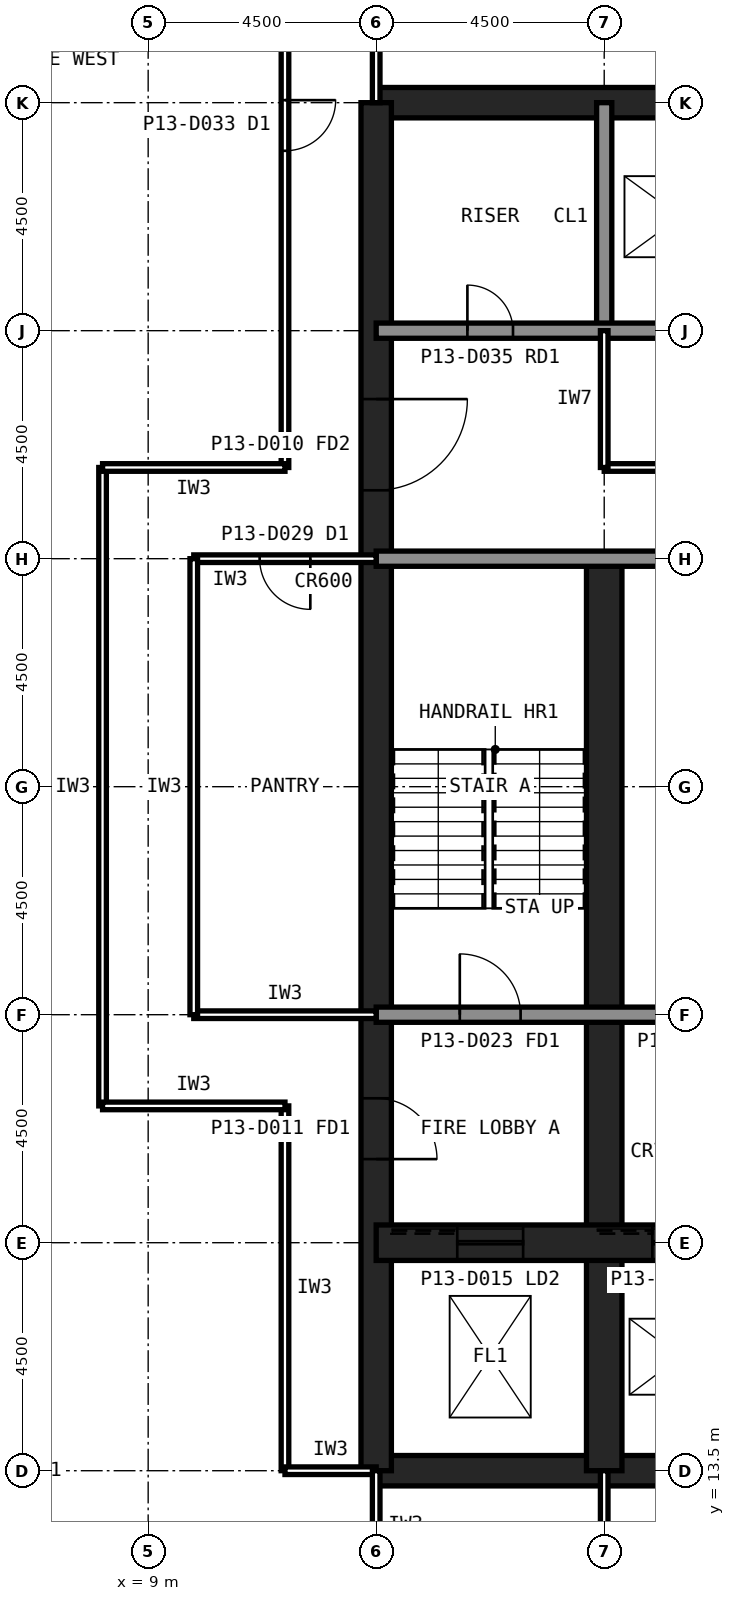
"""IFC4 building model, lengths in metres.
Left out: names, types, materials, properties, quantities, classifications, styles, units other than length and angle.
Written with IfcOpenShell. Run it as: python <this file> out.ifc"""

import sys

from ifc_helpers import new_model, si_unit, direction, frame, frame_2d, origin, place, context, subcontext, project, spatial, rectangle, extrude, element, fill, save


model = new_model("IFC4")
c1 = context("Model", 3, precision=1e-05, world=origin(), true_north=direction((0.0, 1.0)))
c2 = subcontext(c1, "Body", "Model", "MODEL_VIEW")
j1 = project(units=[si_unit("LENGTHUNIT", "METRE"), si_unit("PLANEANGLEUNIT", "RADIAN")], contexts=[c1])
p1 = place(None, origin())
s1 = spatial("IfcSite", under=j1, at=p1, CompositionType="ELEMENT")
p2 = place(p1, origin())
s2 = spatial("IfcBuilding", under=s1, at=p2, CompositionType="ELEMENT")
p3 = place(p2, frame((0.0, 0.0, 54.2)))
s3 = spatial("IfcBuildingStorey", under=s2, at=p3, CompositionType="ELEMENT", Elevation=54.2)
for number, where, z_axis, x_axis in (
    (1, (13.5, 13.5, 0.0), (0.0, 0.0, 1.0), (1.0, 0.0, 0.0)),
    (2, (40.5, 40.5, 0.0), (0.0, 0.0, 1.0), (-1.0, 0.0, 0.0)),
):
    element("IfcWall", number, at=place(p3, frame(where, z_axis=z_axis, x_axis=x_axis)), inside=s3, PredefinedType="SHEAR", context=c2, shape_type="SweptSolid", body=[
        extrude(rectangle(XDim=27.0, YDim=0.6, at=frame_2d((13.5, 0.0))), origin(), (0.0, 0.0, 1.0), 4.2),
    ])
p4 = place(p3, frame((13.5, 40.5, 0.0), z_axis=(0.0, 0.0, 1.0), x_axis=(0.0, -1.0, 0.0)))
e3 = element("IfcWall", 3, at=p4, inside=s3, PredefinedType="SHEAR", context=c2, shape_type="SweptSolid", body=[
    extrude(rectangle(XDim=27.0, YDim=0.6, at=frame_2d((13.5, 0.0))), origin(), (0.0, 0.0, 1.0), 4.2),
])
p5 = place(p4, frame((19.65, 0.0, 0.0)))
e4 = element("IfcOpeningElement", 4, at=p5, cuts=e3, PredefinedType="OPENING", context=c2, shape_type="SweptSolid", body=[
    extrude(rectangle(XDim=1.2, YDim=2.1, at=frame_2d((0.6, 1.05))), frame((0.0, 0.31, 0.0), z_axis=(0.0, -1.0, 0.0), x_axis=(1.0, 0.0, 0.0)), (0.0, 0.0, 1.0), 0.62),
])
p6 = place(p4, frame((5.85, 0.0, 0.0)))
e5 = element("IfcOpeningElement", 5, at=p6, cuts=e3, PredefinedType="OPENING", context=c2, shape_type="SweptSolid", body=[
    extrude(rectangle(XDim=1.8, YDim=2.1, at=frame_2d((0.9, 1.05))), frame((0.0, 0.31, 0.0), z_axis=(0.0, -1.0, 0.0), x_axis=(1.0, 0.0, 0.0)), (0.0, 0.0, 1.0), 0.62),
])
p7 = place(p3, frame((18.0, 13.5, 0.0), z_axis=(0.0, 0.0, 1.0), x_axis=(0.0, 1.0, 0.0)))
e6 = element("IfcWall", 6, at=p7, inside=s3, PredefinedType="SHEAR", context=c2, shape_type="SweptSolid", body=[
    extrude(rectangle(XDim=18.0, YDim=0.7, at=frame_2d((9.0, 0.0))), origin(), (0.0, 0.0, 1.0), 4.2),
])
p8 = place(p3, frame((18.0, 36.0, 0.0), z_axis=(0.0, 0.0, 1.0), x_axis=(0.0, 1.0, 0.0)))
e7 = element("IfcWall", 7, at=p8, inside=s3, PredefinedType="SOLIDWALL", context=c2, shape_type="SweptSolid", body=[
    extrude(rectangle(XDim=4.5, YDim=0.3, at=frame_2d((2.25, 0.0))), origin(), (0.0, 0.0, 1.0), 4.04),
])
p9 = place(p3, frame((13.5, 18.0, 0.0), z_axis=(0.0, 0.0, 1.0), x_axis=(1.0, 0.0, 0.0)))
e8 = element("IfcWall", 8, at=p9, inside=s3, PredefinedType="SHEAR", context=c2, shape_type="SweptSolid", body=[
    extrude(rectangle(XDim=27.0, YDim=0.7, at=frame_2d((13.5, 0.0))), origin(), (0.0, 0.0, 1.0), 4.2),
])
p10 = place(p9, frame((24.3, 0.0, 0.0)))
e9 = element("IfcOpeningElement", 9, at=p10, cuts=e8, PredefinedType="OPENING", context=c2, shape_type="SweptSolid", body=[
    extrude(rectangle(XDim=0.9, YDim=2.1, at=frame_2d((0.45, 1.05))), frame((0.0, 0.36, 0.0), z_axis=(0.0, -1.0, 0.0), x_axis=(1.0, 0.0, 0.0)), (0.0, 0.0, 1.0), 0.72),
])
p11 = place(p9, frame((5.45, 0.0, 0.0)))
e10 = element("IfcOpeningElement", 10, at=p11, cuts=e8, PredefinedType="OPENING", context=c2, shape_type="SweptSolid", body=[
    extrude(rectangle(XDim=1.1, YDim=2.1, at=frame_2d((0.55, 1.05))), frame((0.0, 0.36, 0.0), z_axis=(0.0, -1.0, 0.0), x_axis=(1.0, 0.0, 0.0)), (0.0, 0.0, 1.0), 0.72),
])
p12 = place(p9, frame((8.45, 0.0, 0.0)))
e11 = element("IfcOpeningElement", 11, at=p12, cuts=e8, PredefinedType="OPENING", context=c2, shape_type="SweptSolid", body=[
    extrude(rectangle(XDim=1.1, YDim=2.1, at=frame_2d((0.55, 1.05))), frame((0.0, 0.36, 0.0), z_axis=(0.0, -1.0, 0.0), x_axis=(1.0, 0.0, 0.0)), (0.0, 0.0, 1.0), 0.72),
])
p13 = place(p9, frame((11.45, 0.0, 0.0)))
e12 = element("IfcOpeningElement", 12, at=p13, cuts=e8, PredefinedType="OPENING", context=c2, shape_type="SweptSolid", body=[
    extrude(rectangle(XDim=1.1, YDim=2.1, at=frame_2d((0.55, 1.05))), frame((0.0, 0.36, 0.0), z_axis=(0.0, -1.0, 0.0), x_axis=(1.0, 0.0, 0.0)), (0.0, 0.0, 1.0), 0.72),
])
p14 = place(p9, frame((14.45, 0.0, 0.0)))
e13 = element("IfcOpeningElement", 13, at=p14, cuts=e8, PredefinedType="OPENING", context=c2, shape_type="SweptSolid", body=[
    extrude(rectangle(XDim=1.1, YDim=2.1, at=frame_2d((0.55, 1.05))), frame((0.0, 0.36, 0.0), z_axis=(0.0, -1.0, 0.0), x_axis=(1.0, 0.0, 0.0)), (0.0, 0.0, 1.0), 0.72),
])
p15 = place(p9, frame((17.45, 0.0, 0.0)))
e14 = element("IfcOpeningElement", 14, at=p15, cuts=e8, PredefinedType="OPENING", context=c2, shape_type="SweptSolid", body=[
    extrude(rectangle(XDim=1.1, YDim=2.1, at=frame_2d((0.55, 1.05))), frame((0.0, 0.36, 0.0), z_axis=(0.0, -1.0, 0.0), x_axis=(1.0, 0.0, 0.0)), (0.0, 0.0, 1.0), 0.72),
])
p16 = place(p9, frame((20.45, 0.0, 0.0)))
e15 = element("IfcOpeningElement", 15, at=p16, cuts=e8, PredefinedType="OPENING", context=c2, shape_type="SweptSolid", body=[
    extrude(rectangle(XDim=1.1, YDim=2.1, at=frame_2d((0.55, 1.05))), frame((0.0, 0.36, 0.0), z_axis=(0.0, -1.0, 0.0), x_axis=(1.0, 0.0, 0.0)), (0.0, 0.0, 1.0), 0.72),
])
p17 = place(p9, frame((1.6, 0.0, 0.0)))
e16 = element("IfcOpeningElement", 16, at=p17, cuts=e8, PredefinedType="OPENING", context=c2, shape_type="SweptSolid", body=[
    extrude(rectangle(XDim=1.3, YDim=2.2, at=frame_2d((0.65, 1.1))), frame((0.0, 0.36, 0.0), z_axis=(0.0, -1.0, 0.0), x_axis=(1.0, 0.0, 0.0)), (0.0, 0.0, 1.0), 0.72),
])
p18 = place(p3, frame((13.5, 36.0, 0.0), z_axis=(0.0, 0.0, 1.0), x_axis=(1.0, 0.0, 0.0)))
e17 = element("IfcWall", 17, at=p18, inside=s3, PredefinedType="SOLIDWALL", context=c2, shape_type="SweptSolid", body=[
    extrude(rectangle(XDim=27.0, YDim=0.3, at=frame_2d((13.5, 0.0))), origin(), (0.0, 0.0, 1.0), 4.04),
])
p19 = place(p18, frame((1.8, 0.0, 0.0)))
e18 = element("IfcOpeningElement", 18, at=p19, cuts=e17, PredefinedType="OPENING", context=c2, shape_type="SweptSolid", body=[
    extrude(rectangle(XDim=0.9, YDim=2.1, at=frame_2d((0.45, 1.05))), frame((0.0, 0.16, 0.0), z_axis=(0.0, -1.0, 0.0), x_axis=(1.0, 0.0, 0.0)), (0.0, 0.0, 1.0), 0.32),
])
p20 = place(p18, frame((24.1, 0.0, 0.0)))
e19 = element("IfcOpeningElement", 19, at=p20, cuts=e17, PredefinedType="OPENING", context=c2, shape_type="SweptSolid", body=[
    extrude(rectangle(XDim=1.3, YDim=2.2, at=frame_2d((0.65, 1.1))), frame((0.0, 0.16, 0.0), z_axis=(0.0, -1.0, 0.0), x_axis=(1.0, 0.0, 0.0)), (0.0, 0.0, 1.0), 0.32),
])
p21 = place(p3, frame((13.5, 22.5, 0.0), z_axis=(0.0, 0.0, 1.0), x_axis=(1.0, 0.0, 0.0)))
e20 = element("IfcWall", 20, at=p21, inside=s3, PredefinedType="SOLIDWALL", context=c2, shape_type="SweptSolid", body=[
    extrude(rectangle(XDim=27.0, YDim=0.3, at=frame_2d((13.5, 0.0))), origin(), (0.0, 0.0, 1.0), 4.04),
])
p22 = place(p21, frame((1.65, 0.0, 0.0)))
e21 = element("IfcOpeningElement", 21, at=p22, cuts=e20, PredefinedType="OPENING", context=c2, shape_type="SweptSolid", body=[
    extrude(rectangle(XDim=1.2, YDim=2.1, at=frame_2d((0.6, 1.05))), frame((0.0, 0.16, 0.0), z_axis=(0.0, -1.0, 0.0), x_axis=(1.0, 0.0, 0.0)), (0.0, 0.0, 1.0), 0.32),
])
p23 = place(p21, frame((6.025, 0.0, 0.0)))
e22 = element("IfcOpeningElement", 22, at=p23, cuts=e20, PredefinedType="OPENING", context=c2, shape_type="SweptSolid", body=[
    extrude(rectangle(XDim=1.0, YDim=2.1, at=frame_2d((0.5, 1.05))), frame((0.0, 0.16, 0.0), z_axis=(0.0, -1.0, 0.0), x_axis=(1.0, 0.0, 0.0)), (0.0, 0.0, 1.0), 0.32),
])
p24 = place(p21, frame((10.525, 0.0, 0.0)))
e23 = element("IfcOpeningElement", 23, at=p24, cuts=e20, PredefinedType="OPENING", context=c2, shape_type="SweptSolid", body=[
    extrude(rectangle(XDim=1.0, YDim=2.1, at=frame_2d((0.5, 1.05))), frame((0.0, 0.16, 0.0), z_axis=(0.0, -1.0, 0.0), x_axis=(1.0, 0.0, 0.0)), (0.0, 0.0, 1.0), 0.32),
])
p25 = place(p21, frame((19.75, 0.0, 0.0)))
e24 = element("IfcOpeningElement", 24, at=p25, cuts=e20, PredefinedType="OPENING", context=c2, shape_type="SweptSolid", body=[
    extrude(rectangle(XDim=1.0, YDim=2.1, at=frame_2d((0.5, 1.05))), frame((0.0, 0.16, 0.0), z_axis=(0.0, -1.0, 0.0), x_axis=(1.0, 0.0, 0.0)), (0.0, 0.0, 1.0), 0.32),
])
p26 = place(p21, frame((15.05, 0.0, 0.0)))
e25 = element("IfcOpeningElement", 25, at=p26, cuts=e20, PredefinedType="OPENING", context=c2, shape_type="SweptSolid", body=[
    extrude(rectangle(XDim=1.4, YDim=2.4, at=frame_2d((0.7, 1.2))), frame((0.0, 0.16, 0.0), z_axis=(0.0, -1.0, 0.0), x_axis=(1.0, 0.0, 0.0)), (0.0, 0.0, 1.0), 0.32),
])
p27 = place(p3, frame((13.5, 31.5, 0.0), z_axis=(0.0, 0.0, 1.0), x_axis=(1.0, 0.0, 0.0)))
e26 = element("IfcWall", 26, at=p27, inside=s3, PredefinedType="SOLIDWALL", context=c2, shape_type="SweptSolid", body=[
    extrude(rectangle(XDim=27.0, YDim=0.3, at=frame_2d((13.5, 0.0))), origin(), (0.0, 0.0, 1.0), 4.04),
])
p28 = place(p27, frame((24.15, 0.0, 0.0)))
e27 = element("IfcOpeningElement", 27, at=p28, cuts=e26, PredefinedType="OPENING", context=c2, shape_type="SweptSolid", body=[
    extrude(rectangle(XDim=1.2, YDim=2.1, at=frame_2d((0.6, 1.05))), frame((0.0, 0.16, 0.0), z_axis=(0.0, -1.0, 0.0), x_axis=(1.0, 0.0, 0.0)), (0.0, 0.0, 1.0), 0.32),
])
p29 = place(p27, frame((15.3, 0.0, 0.0)))
e28 = element("IfcOpeningElement", 28, at=p29, cuts=e26, PredefinedType="OPENING", context=c2, shape_type="SweptSolid", body=[
    extrude(rectangle(XDim=0.9, YDim=2.1, at=frame_2d((0.45, 1.05))), frame((0.0, 0.16, 0.0), z_axis=(0.0, -1.0, 0.0), x_axis=(1.0, 0.0, 0.0)), (0.0, 0.0, 1.0), 0.32),
])
p30 = place(p27, frame((19.8, 0.0, 0.0)))
e29 = element("IfcOpeningElement", 29, at=p30, cuts=e26, PredefinedType="OPENING", context=c2, shape_type="SweptSolid", body=[
    extrude(rectangle(XDim=0.9, YDim=2.1, at=frame_2d((0.45, 1.05))), frame((0.0, 0.16, 0.0), z_axis=(0.0, -1.0, 0.0), x_axis=(1.0, 0.0, 0.0)), (0.0, 0.0, 1.0), 0.32),
])
p31 = place(p3, frame((18.0, 33.3, 0.0), z_axis=(0.0, 0.0, 1.0), x_axis=(1.0, 0.0, 0.0)))
e30 = element("IfcWall", 30, at=p31, inside=s3, PredefinedType="PARTITIONING", context=c2, shape_type="SweptSolid", body=[
    extrude(rectangle(XDim=18.0, YDim=0.15, at=frame_2d((9.0, 0.0))), origin(), (0.0, 0.0, 1.0), 4.04),
])
p32 = place(p31, frame((5.55, 0.0, 0.0)))
e31 = element("IfcOpeningElement", 31, at=p32, cuts=e30, PredefinedType="OPENING", context=c2, shape_type="SweptSolid", body=[
    extrude(rectangle(XDim=0.9, YDim=2.1, at=frame_2d((0.45, 1.05))), frame((0.0, 0.085, 0.0), z_axis=(0.0, -1.0, 0.0), x_axis=(1.0, 0.0, 0.0)), (0.0, 0.0, 1.0), 0.17),
])
p33 = place(p31, frame((14.55, 0.0, 0.0)))
e32 = element("IfcOpeningElement", 32, at=p33, cuts=e30, PredefinedType="OPENING", context=c2, shape_type="SweptSolid", body=[
    extrude(rectangle(XDim=0.9, YDim=2.1, at=frame_2d((0.45, 1.05))), frame((0.0, 0.085, 0.0), z_axis=(0.0, -1.0, 0.0), x_axis=(1.0, 0.0, 0.0)), (0.0, 0.0, 1.0), 0.17),
])
p34 = place(p3, frame((18.0, 33.3, 0.0), z_axis=(0.0, 0.0, 1.0), x_axis=(0.0, 1.0, 0.0)))
e33 = element("IfcWall", 33, at=p34, inside=s3, PredefinedType="PARTITIONING", context=c2, shape_type="SweptSolid", body=[
    extrude(rectangle(XDim=2.7, YDim=0.15, at=frame_2d((1.35, 0.0))), origin(), (0.0, 0.0, 1.0), 4.04),
])
p35 = place(p3, frame((8.1, 33.3, 0.0), z_axis=(0.0, 0.0, 1.0), x_axis=(0.0, -1.0, 0.0)))
e34 = element("IfcWall", 34, at=p35, inside=s3, PredefinedType="PARTITIONING", context=c2, shape_type="SweptSolid", body=[
    extrude(rectangle(XDim=12.6, YDim=0.15, at=frame_2d((6.3, 0.0))), origin(), (0.0, 0.0, 1.0), 4.04),
])
p36 = place(p35, frame((5.8, 0.0, 0.0)))
e35 = element("IfcOpeningElement", 35, at=p36, cuts=e34, PredefinedType="OPENING", context=c2, shape_type="SweptSolid", body=[
    extrude(rectangle(XDim=1.0, YDim=2.1, at=frame_2d((0.5, 1.05))), frame((0.0, 0.085, 0.0), z_axis=(0.0, -1.0, 0.0), x_axis=(1.0, 0.0, 0.0)), (0.0, 0.0, 1.0), 0.17),
])
for number, where, z_axis, x_axis in (
    (36, (11.7, 20.7, 0.0), (0.0, 0.0, 1.0), (0.0, -1.0, 0.0)),
    (37, (11.7, 40.5, 0.0), (0.0, 0.0, 1.0), (0.0, -1.0, 0.0)),
):
    element("IfcWall", number, at=place(p3, frame(where, z_axis=z_axis, x_axis=x_axis)), inside=s3, PredefinedType="PARTITIONING", context=c2, shape_type="SweptSolid", body=[
        extrude(rectangle(XDim=7.2, YDim=0.15, at=frame_2d((3.6, 0.0))), origin(), (0.0, 0.0, 1.0), 4.04),
    ])
for number, where, z_axis, x_axis in (
    (38, (8.1, 20.7, 0.0), (0.0, 0.0, 1.0), (1.0, 0.0, 0.0)),
    (39, (11.7, 33.3, 0.0), (0.0, 0.0, 1.0), (-1.0, 0.0, 0.0)),
):
    element("IfcWall", number, at=place(p3, frame(where, z_axis=z_axis, x_axis=x_axis)), inside=s3, PredefinedType="PARTITIONING", context=c2, shape_type="SweptSolid", body=[
        extrude(rectangle(XDim=3.6, YDim=0.15, at=frame_2d((1.8, 0.0))), origin(), (0.0, 0.0, 1.0), 4.04),
    ])
for number, where, z_axis, x_axis in (
    (40, (11.7, 13.5, 0.0), (0.0, 0.0, 1.0), (1.0, 0.0, 0.0)),
    (41, (13.5, 40.5, 0.0), (0.0, 0.0, 1.0), (-1.0, 0.0, 0.0)),
):
    element("IfcWall", number, at=place(p3, frame(where, z_axis=z_axis, x_axis=x_axis)), inside=s3, PredefinedType="PARTITIONING", context=c2, shape_type="SweptSolid", body=[
        extrude(rectangle(XDim=1.8, YDim=0.15, at=frame_2d((0.9, 0.0))), origin(), (0.0, 0.0, 1.0), 3.189),
    ])
p37 = place(p3, frame((18.0, 8.1, 0.0), z_axis=(0.0, 0.0, 1.0), x_axis=(0.0, 1.0, 0.0)))
e42 = element("IfcWall", 42, at=p37, inside=s3, PredefinedType="PARTITIONING", context=c2, shape_type="SweptSolid", body=[
    extrude(rectangle(XDim=5.4, YDim=0.15, at=frame_2d((2.7, 0.0))), origin(), (0.0, 0.0, 1.0), 3.189),
])
p38 = place(p3, frame((13.5, 13.5, 0.0), z_axis=(0.0, 0.0, 1.0), x_axis=(0.0, -1.0, 0.0)))
e43 = element("IfcWall", 43, at=p38, inside=s3, PredefinedType="PARTITIONING", context=c2, shape_type="SweptSolid", body=[
    extrude(rectangle(XDim=5.4, YDim=0.15, at=frame_2d((2.7, 0.0))), origin(), (0.0, 0.0, 1.0), 3.189),
])
p39 = place(p38, frame((2.2, 0.0, 0.0)))
e44 = element("IfcOpeningElement", 44, at=p39, cuts=e43, PredefinedType="OPENING", context=c2, shape_type="SweptSolid", body=[
    extrude(rectangle(XDim=1.0, YDim=2.1, at=frame_2d((0.5, 1.05))), frame((0.0, 0.085, 0.0), z_axis=(0.0, -1.0, 0.0), x_axis=(1.0, 0.0, 0.0)), (0.0, 0.0, 1.0), 0.17),
])
p40 = place(p3, frame((13.5, 45.0, 0.0), z_axis=(0.0, 0.0, 1.0), x_axis=(0.0, -1.0, 0.0)))
e45 = element("IfcWall", 45, at=p40, inside=s3, PredefinedType="PARTITIONING", context=c2, shape_type="SweptSolid", body=[
    extrude(rectangle(XDim=4.5, YDim=0.15, at=frame_2d((2.25, 0.0))), origin(), (0.0, 0.0, 1.0), 3.189),
])
p41 = place(p3, frame((9.9, 22.5, 0.0), z_axis=(0.0, 0.0, 1.0), x_axis=(1.0, 0.0, 0.0)))
e46 = element("IfcWall", 46, at=p41, inside=s3, PredefinedType="PARTITIONING", context=c2, shape_type="SweptSolid", body=[
    extrude(rectangle(XDim=3.6, YDim=0.15, at=frame_2d((1.8, 0.0))), origin(), (0.0, 0.0, 1.0), 3.189),
])
p42 = place(p3, frame((13.5, 31.5, 0.0), z_axis=(0.0, 0.0, 1.0), x_axis=(-1.0, 0.0, 0.0)))
e47 = element("IfcWall", 47, at=p42, inside=s3, PredefinedType="PARTITIONING", context=c2, shape_type="SweptSolid", body=[
    extrude(rectangle(XDim=3.6, YDim=0.15, at=frame_2d((1.8, 0.0))), origin(), (0.0, 0.0, 1.0), 3.189),
])
p43 = place(p42, frame((1.3, 0.0, 0.0)))
e48 = element("IfcOpeningElement", 48, at=p43, cuts=e47, PredefinedType="OPENING", context=c2, shape_type="SweptSolid", body=[
    extrude(rectangle(XDim=1.0, YDim=2.1, at=frame_2d((0.5, 1.05))), frame((0.0, 0.085, 0.0), z_axis=(0.0, -1.0, 0.0), x_axis=(1.0, 0.0, 0.0)), (0.0, 0.0, 1.0), 0.17),
])
p44 = place(p3, frame((9.9, 31.5, 0.0), z_axis=(0.0, 0.0, 1.0), x_axis=(0.0, -1.0, 0.0)))
e49 = element("IfcWall", 49, at=p44, inside=s3, PredefinedType="PARTITIONING", context=c2, shape_type="SweptSolid", body=[
    extrude(rectangle(XDim=9.0, YDim=0.15, at=frame_2d((4.5, 0.0))), origin(), (0.0, 0.0, 1.0), 4.04),
])
p45 = place(p5, origin())
e50 = element("IfcDoor", 50, at=p45, inside=s3, OperationType="SINGLE_SWING_RIGHT", PredefinedType="DOOR", context=c2, shape_type="SweptSolid", body=[
    extrude(rectangle(XDim=1.2, YDim=2.1, at=frame_2d((0.6, 1.05))), frame((0.0, 0.025, 0.0), z_axis=(0.0, -1.0, 0.0), x_axis=(1.0, 0.0, 0.0)), (0.0, 0.0, 1.0), 0.05),
])
fill(e4, e50)
p46 = place(p6, origin())
e51 = element("IfcDoor", 51, at=p46, inside=s3, OperationType="SINGLE_SWING_LEFT", PredefinedType="DOOR", context=c2, shape_type="SweptSolid", body=[
    extrude(rectangle(XDim=1.8, YDim=2.1, at=frame_2d((0.9, 1.05))), frame((0.0, 0.025, 0.0), z_axis=(0.0, -1.0, 0.0), x_axis=(1.0, 0.0, 0.0)), (0.0, 0.0, 1.0), 0.05),
])
fill(e5, e51)
p47 = place(p22, origin())
e52 = element("IfcDoor", 52, at=p47, inside=s3, OperationType="SINGLE_SWING_LEFT", PredefinedType="DOOR", context=c2, shape_type="SweptSolid", body=[
    extrude(rectangle(XDim=1.2, YDim=2.1, at=frame_2d((0.6, 1.05))), frame((0.0, 0.025, 0.0), z_axis=(0.0, -1.0, 0.0), x_axis=(1.0, 0.0, 0.0)), (0.0, 0.0, 1.0), 0.05),
])
fill(e21, e52)
p48 = place(p19, origin())
e53 = element("IfcDoor", 53, at=p48, inside=s3, OperationType="SINGLE_SWING_LEFT", PredefinedType="DOOR", context=c2, shape_type="SweptSolid", body=[
    extrude(rectangle(XDim=0.9, YDim=2.1, at=frame_2d((0.45, 1.05))), frame((0.0, 0.025, 0.0), z_axis=(0.0, -1.0, 0.0), x_axis=(1.0, 0.0, 0.0)), (0.0, 0.0, 1.0), 0.05),
])
fill(e18, e53)
p49 = place(p11, origin())
e54 = element("IfcDoor", 54, at=p49, inside=s3, OperationType="SLIDING_TO_LEFT", PredefinedType="DOOR", context=c2, shape_type="SweptSolid", body=[
    extrude(rectangle(XDim=1.1, YDim=2.1, at=frame_2d((0.55, 1.05))), frame((0.0, 0.025, 0.0), z_axis=(0.0, -1.0, 0.0), x_axis=(1.0, 0.0, 0.0)), (0.0, 0.0, 1.0), 0.05),
])
fill(e10, e54)
p50 = place(p17, origin())
e55 = element("IfcDoor", 55, at=p50, inside=s3, OperationType="SLIDING_TO_LEFT", PredefinedType="DOOR", context=c2, shape_type="SweptSolid", body=[
    extrude(rectangle(XDim=1.3, YDim=2.2, at=frame_2d((0.65, 1.1))), frame((0.0, 0.025, 0.0), z_axis=(0.0, -1.0, 0.0), x_axis=(1.0, 0.0, 0.0)), (0.0, 0.0, 1.0), 0.05),
])
fill(e16, e55)
p51 = place(p36, origin())
e56 = element("IfcDoor", 56, at=p51, inside=s3, OperationType="SINGLE_SWING_LEFT", PredefinedType="DOOR", context=c2, shape_type="SweptSolid", body=[
    extrude(rectangle(XDim=1.0, YDim=2.1, at=frame_2d((0.5, 1.05))), frame((0.0, 0.025, 0.0), z_axis=(0.0, -1.0, 0.0), x_axis=(1.0, 0.0, 0.0)), (0.0, 0.0, 1.0), 0.05),
])
fill(e35, e56)
p52 = place(p43, origin())
e57 = element("IfcDoor", 57, at=p52, inside=s3, OperationType="SINGLE_SWING_LEFT", PredefinedType="DOOR", context=c2, shape_type="SweptSolid", body=[
    extrude(rectangle(XDim=1.0, YDim=2.1, at=frame_2d((0.5, 1.05))), frame((0.0, 0.025, 0.0), z_axis=(0.0, -1.0, 0.0), x_axis=(1.0, 0.0, 0.0)), (0.0, 0.0, 1.0), 0.05),
])
fill(e48, e57)
save(model, sys.argv[1])
